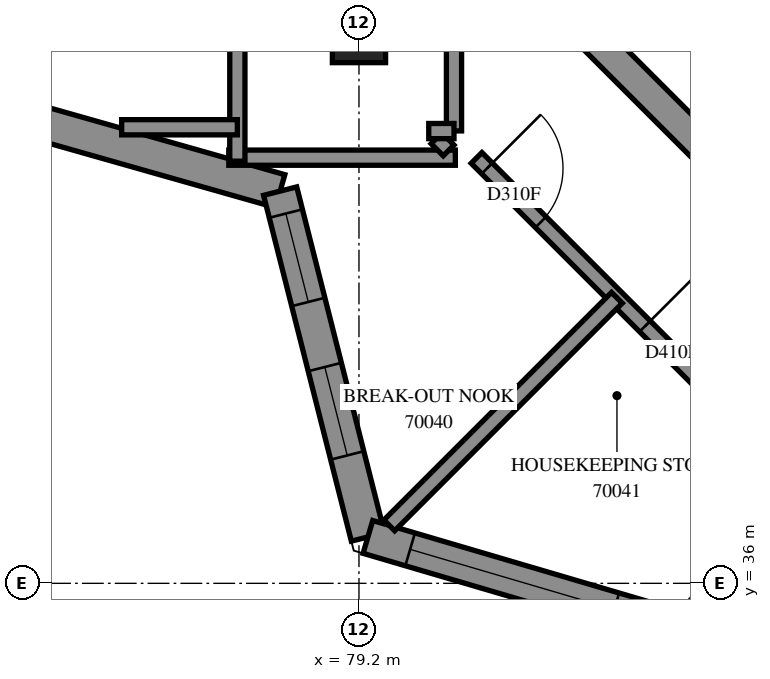
"""IFC4 building model, lengths in metres.
Left out: names, types, materials, properties, quantities, classifications, styles, units other than length and angle.
Written with IfcOpenShell. Run it as: python <this file> out.ifc"""

import sys

from ifc_helpers import new_model, si_unit, direction, frame, frame_2d, origin, origin_2d, place, context, subcontext, project, spatial, polyline, rectangle, outline, extrude, element, fill, save


model = new_model("IFC4")
c1 = context("Model", 3, precision=1e-05, world=origin(), true_north=direction((0.0, 1.0)))
c2 = subcontext(c1, "Body", "Model", "MODEL_VIEW")
j1 = project(units=[si_unit("LENGTHUNIT", "METRE"), si_unit("PLANEANGLEUNIT", "RADIAN")], contexts=[c1])
p1 = place(None, origin())
s1 = spatial("IfcSite", under=j1, at=p1, CompositionType="ELEMENT")
p2 = place(p1, origin())
s2 = spatial("IfcBuilding", under=s1, at=p2, CompositionType="ELEMENT")
p3 = place(p2, frame((0.0, 0.0, 257.4)))
s3 = spatial("IfcBuildingStorey", under=s2, at=p3, CompositionType="ELEMENT", Elevation=257.4)
p4 = place(p3, frame((79.2, 43.2, 0.0), z_axis=(0.0, 0.0, 1.0), x_axis=(1.0, 0.0, 0.0)))
e1 = element("IfcColumn", 1, at=p4, inside=s3, PredefinedType="COLUMN", context=c2, shape_type="SweptSolid", body=[
    extrude(rectangle(XDim=0.7, YDim=0.7, at=origin_2d()), origin(), (0.0, 0.0, 1.0), 3.1),
])
p5 = place(p3, frame((76.23, 49.231, -0.3), z_axis=(0.0, 0.0, 1.0), x_axis=(0.7071034917, -0.7071100706, 0.0)))
e2 = element("IfcWall", 2, at=p5, inside=s3, PredefinedType="SHEAR", context=c2, shape_type="SweptSolid", body=[
    extrude(rectangle(XDim=15.2, YDim=0.4, at=frame_2d((7.6, 0.0))), origin(), (0.0, 0.0, 1.0), 2.7),
])
p6 = place(p3, frame((78.988, 51.423, 0.0), z_axis=(0.0, 0.0, 1.0), x_axis=(0.7071067812, -0.7071067812, 0.0)))
e3 = element("IfcWall", 3, at=p6, inside=s3, PredefinedType="SOLIDWALL", context=c2, shape_type="SweptSolid", body=[
    extrude(rectangle(XDim=14.4, YDim=0.3, at=frame_2d((7.2, 0.0))), origin(), (0.0, 0.0, 1.0), 3.1),
])
p7 = place(p6, frame((1.35, 0.0, 0.0)))
e4 = element("IfcOpeningElement", 4, at=p7, cuts=e3, PredefinedType="OPENING", context=c2, shape_type="SweptSolid", body=[
    extrude(rectangle(XDim=0.9, YDim=2.1, at=frame_2d((0.45, 1.05))), frame((0.0, 0.16, 0.0), z_axis=(0.0, -1.0, 0.0), x_axis=(1.0, 0.0, 0.0)), (0.0, 0.0, 1.0), 0.32),
])
p8 = place(p6, frame((4.95, 0.0, 0.0)))
e5 = element("IfcOpeningElement", 5, at=p8, cuts=e3, PredefinedType="OPENING", context=c2, shape_type="SweptSolid", body=[
    extrude(rectangle(XDim=0.9, YDim=2.1, at=frame_2d((0.45, 1.05))), frame((0.0, 0.16, 0.0), z_axis=(0.0, -1.0, 0.0), x_axis=(1.0, 0.0, 0.0)), (0.0, 0.0, 1.0), 0.32),
])
p9 = place(p6, frame((8.55, 0.0, 0.0)))
e6 = element("IfcOpeningElement", 6, at=p9, cuts=e3, PredefinedType="OPENING", context=c2, shape_type="SweptSolid", body=[
    extrude(rectangle(XDim=0.9, YDim=2.1, at=frame_2d((0.45, 1.05))), frame((0.0, 0.16, 0.0), z_axis=(0.0, -1.0, 0.0), x_axis=(1.0, 0.0, 0.0)), (0.0, 0.0, 1.0), 0.32),
])
p10 = place(p6, frame((12.05, 0.0, 0.0)))
e7 = element("IfcOpeningElement", 7, at=p10, cuts=e3, PredefinedType="OPENING", context=c2, shape_type="SweptSolid", body=[
    extrude(rectangle(XDim=1.1, YDim=2.1, at=frame_2d((0.55, 1.05))), frame((0.0, 0.16, 0.0), z_axis=(0.0, -1.0, 0.0), x_axis=(1.0, 0.0, 0.0)), (0.0, 0.0, 1.0), 0.32),
])
p11 = place(p3, frame((74.398, 42.229, 0.0), z_axis=(0.0, 0.0, 1.0), x_axis=(0.961995937, -0.2730637604, 0.0)))
e8 = element("IfcWall", 8, at=p11, inside=s3, PredefinedType="SOLIDWALL", context=c2, shape_type="SweptSolid", body=[
    extrude(outline(polyline([(0.045, -0.225), (3.784, -0.225), (4.043, 0.225), (-0.045, 0.225), (0.045, -0.225)])), origin(), (0.0, 0.0, 1.0), 3.1),
])
p12 = place(p3, frame((78.163, 41.16, 0.0), z_axis=(0.0, 0.0, 1.0), x_axis=(0.2459778521, -0.9692754491, 0.0)))
e9 = element("IfcWall", 9, at=p12, inside=s3, PredefinedType="SOLIDWALL", context=c2, shape_type="SweptSolid", body=[
    extrude(outline(polyline([(0.13, -0.225), (4.822, -0.225), (4.566, 0.225), (-0.13, 0.225), (0.13, -0.225)])), origin(), (0.0, 0.0, 1.0), 3.1),
])
p13 = place(p12, frame((0.305, 0.0, 0.45)))
e10 = element("IfcOpeningElement", 10, at=p13, cuts=e9, PredefinedType="OPENING", context=c2, shape_type="SweptSolid", body=[
    extrude(rectangle(XDim=1.2, YDim=2.55, at=frame_2d((0.6, 1.275))), frame((0.0, 0.235, 0.0), z_axis=(0.0, -1.0, 0.0), x_axis=(1.0, 0.0, 0.0)), (0.0, 0.0, 1.0), 0.47),
])
p14 = place(p12, frame((2.388, 0.0, 0.45)))
e11 = element("IfcOpeningElement", 11, at=p14, cuts=e9, PredefinedType="OPENING", context=c2, shape_type="SweptSolid", body=[
    extrude(rectangle(XDim=1.2, YDim=2.55, at=frame_2d((0.6, 1.275))), frame((0.0, 0.235, 0.0), z_axis=(0.0, -1.0, 0.0), x_axis=(1.0, 0.0, 0.0)), (0.0, 0.0, 1.0), 0.47),
])
p15 = place(p3, frame((79.318, 36.61, 0.0), z_axis=(0.0, 0.0, 1.0), x_axis=(0.9593901398, -0.2820825406, 0.0)))
e12 = element("IfcWall", 12, at=p15, inside=s3, PredefinedType="SOLIDWALL", context=c2, shape_type="SweptSolid", body=[
    extrude(outline(polyline([(-0.128, -0.225), (4.465, -0.225), (4.711, 0.225), (0.128, 0.225), (-0.128, -0.225)])), origin(), (0.0, 0.0, 1.0), 3.1),
])
p16 = place(p15, frame((0.579, 0.0, 0.45)))
e13 = element("IfcOpeningElement", 13, at=p16, cuts=e12, PredefinedType="OPENING", context=c2, shape_type="SweptSolid", body=[
    extrude(rectangle(XDim=2.8, YDim=2.55, at=frame_2d((1.4, 1.275))), frame((0.0, 0.235, 0.0), z_axis=(0.0, -1.0, 0.0), x_axis=(1.0, 0.0, 0.0)), (0.0, 0.0, 1.0), 0.47),
])
p17 = place(p3, frame((80.747, 41.597, 0.0), z_axis=(0.0, 0.0, 1.0), x_axis=(0.7071067812, -0.7071067812, 0.0)))
e14 = element("IfcWall", 14, at=p17, inside=s3, PredefinedType="PARTITIONING", context=c2, shape_type="SweptSolid", body=[
    extrude(rectangle(XDim=8.607, YDim=0.2, at=frame_2d((4.303, 0.0))), origin(), (0.0, 0.0, 1.0), 3.1),
])
p18 = place(p17, frame((0.195, 0.0, 0.0)))
e15 = element("IfcOpeningElement", 15, at=p18, cuts=e14, PredefinedType="OPENING", context=c2, shape_type="SweptSolid", body=[
    extrude(rectangle(XDim=1.0, YDim=2.1, at=frame_2d((0.5, 1.05))), frame((0.0, 0.11, 0.0), z_axis=(0.0, -1.0, 0.0), x_axis=(1.0, 0.0, 0.0)), (0.0, 0.0, 1.0), 0.22),
])
p19 = place(p17, frame((3.133, 0.0, 0.0)))
e16 = element("IfcOpeningElement", 16, at=p19, cuts=e14, PredefinedType="OPENING", context=c2, shape_type="SweptSolid", body=[
    extrude(rectangle(XDim=1.0, YDim=2.1, at=frame_2d((0.5, 1.05))), frame((0.0, 0.11, 0.0), z_axis=(0.0, -1.0, 0.0), x_axis=(1.0, 0.0, 0.0)), (0.0, 0.0, 1.0), 0.22),
])
p20 = place(p3, frame((79.599, 36.762, 0.0), z_axis=(0.0, 0.0, 1.0), x_axis=(0.7071185876, 0.7070949745, 0.0)))
e17 = element("IfcWall", 17, at=p20, inside=s3, PredefinedType="PARTITIONING", context=c2, shape_type="SweptSolid", body=[
    extrude(rectangle(XDim=4.235, YDim=0.2, at=frame_2d((2.117, 0.0))), origin(), (0.0, 0.0, 1.0), 3.1),
])
p21 = place(p3, frame((77.487, 41.6, 0.0), z_axis=(0.0, 0.0, 1.0), x_axis=(1.0, 0.0, 0.0)))
e18 = element("IfcWall", 18, at=p21, inside=s3, PredefinedType="PARTITIONING", context=c2, shape_type="SweptSolid", body=[
    extrude(rectangle(XDim=2.981, YDim=0.2, at=frame_2d((1.49, 0.0))), origin(), (0.0, 0.0, 1.0), 3.1),
])
p22 = place(p3, frame((77.6, 41.554, 0.0), z_axis=(0.0, 0.0, 1.0), x_axis=(0.0, 1.0, 0.0)))
e19 = element("IfcWall", 19, at=p22, inside=s3, PredefinedType="PARTITIONING", context=c2, shape_type="SweptSolid", body=[
    extrude(rectangle(XDim=2.914, YDim=0.2, at=frame_2d((1.457, 0.0))), origin(), (0.0, 0.0, 1.0), 3.1),
])
p23 = place(p3, frame((80.45, 41.952, 0.0), z_axis=(0.0, 0.0, 1.0), x_axis=(0.0, 1.0, 0.0)))
e20 = element("IfcWall", 20, at=p23, inside=s3, PredefinedType="PARTITIONING", context=c2, shape_type="SweptSolid", body=[
    extrude(rectangle(XDim=2.498, YDim=0.2, at=frame_2d((1.249, 0.0))), origin(), (0.0, 0.0, 1.0), 3.1),
])
p24 = place(p3, frame((76.078, 42.0, 0.0), z_axis=(0.0, 0.0, 1.0), x_axis=(1.0, 0.0, 0.0)))
e21 = element("IfcWall", 21, at=p24, inside=s3, PredefinedType="PARTITIONING", context=c2, shape_type="SweptSolid", body=[
    extrude(rectangle(XDim=1.522, YDim=0.2, at=frame_2d((0.761, 0.0))), origin(), (0.0, 0.0, 1.0), 3.1),
])
p25 = place(p3, frame((83.528, 35.607, 0.0), z_axis=(0.0, 0.0, 1.0), x_axis=(0.7090904806, 0.7051175011, 0.0)))
e22 = element("IfcWall", 22, at=p25, inside=s3, PredefinedType="PARTITIONING", context=c2, shape_type="SweptSolid", body=[
    extrude(rectangle(XDim=0.579, YDim=0.2, at=frame_2d((0.289, 0.0))), origin(), (0.0, 0.0, 1.0), 3.1),
])
p26 = place(p3, frame((80.221, 41.855, 0.0), z_axis=(0.0, 0.0, 1.0), x_axis=(0.7068844555, -0.707329037, 0.0)))
e23 = element("IfcWall", 23, at=p26, inside=s3, PredefinedType="PARTITIONING", context=c2, shape_type="SweptSolid", body=[
    extrude(rectangle(XDim=0.225, YDim=0.2, at=frame_2d((0.112, 0.0))), origin(), (0.0, 0.0, 1.0), 3.1),
])
p27 = place(p3, frame((80.118, 41.95, 0.0), z_axis=(0.0, 0.0, 1.0), x_axis=(1.0, 0.0, 0.0)))
e24 = element("IfcWall", 24, at=p27, inside=s3, PredefinedType="PARTITIONING", context=c2, shape_type="SweptSolid", body=[
    extrude(rectangle(XDim=0.332, YDim=0.2, at=frame_2d((0.166, 0.0))), origin(), (0.0, 0.0, 1.0), 3.1),
])
p28 = place(p13, origin())
e25 = element("IfcWindow", 25, at=p28, inside=s3, PartitioningType="SINGLE_PANEL", PredefinedType="WINDOW", context=c2, shape_type="SweptSolid", body=[
    extrude(rectangle(XDim=1.2, YDim=2.55, at=frame_2d((0.6, 1.275))), frame((0.0, 0.205, 0.0), z_axis=(0.0, -1.0, 0.0), x_axis=(1.0, 0.0, 0.0)), (0.0, 0.0, 1.0), 0.06),
])
fill(e10, e25)
p29 = place(p14, origin())
e26 = element("IfcWindow", 26, at=p29, inside=s3, PartitioningType="SINGLE_PANEL", PredefinedType="WINDOW", context=c2, shape_type="SweptSolid", body=[
    extrude(rectangle(XDim=1.2, YDim=2.55, at=frame_2d((0.6, 1.275))), frame((0.0, 0.205, 0.0), z_axis=(0.0, -1.0, 0.0), x_axis=(1.0, 0.0, 0.0)), (0.0, 0.0, 1.0), 0.06),
])
fill(e11, e26)
p30 = place(p16, origin())
e27 = element("IfcWindow", 27, at=p30, inside=s3, PartitioningType="SINGLE_PANEL", PredefinedType="WINDOW", context=c2, shape_type="SweptSolid", body=[
    extrude(rectangle(XDim=2.8, YDim=2.55, at=frame_2d((1.4, 1.275))), frame((0.0, 0.205, 0.0), z_axis=(0.0, -1.0, 0.0), x_axis=(1.0, 0.0, 0.0)), (0.0, 0.0, 1.0), 0.06),
])
fill(e13, e27)
p31 = place(p18, origin())
e28 = element("IfcDoor", 28, at=p31, inside=s3, OperationType="SINGLE_SWING_LEFT", PredefinedType="DOOR", context=c2, shape_type="SweptSolid", body=[
    extrude(rectangle(XDim=1.0, YDim=2.1, at=frame_2d((0.5, 1.05))), frame((0.0, 0.025, 0.0), z_axis=(0.0, -1.0, 0.0), x_axis=(1.0, 0.0, 0.0)), (0.0, 0.0, 1.0), 0.05),
])
fill(e15, e28)
p32 = place(p19, origin())
e29 = element("IfcDoor", 29, at=p32, inside=s3, OperationType="SINGLE_SWING_LEFT", PredefinedType="DOOR", context=c2, shape_type="SweptSolid", body=[
    extrude(rectangle(XDim=1.0, YDim=2.1, at=frame_2d((0.5, 1.05))), frame((0.0, 0.025, 0.0), z_axis=(0.0, -1.0, 0.0), x_axis=(1.0, 0.0, 0.0)), (0.0, 0.0, 1.0), 0.05),
])
fill(e16, e29)
save(model, sys.argv[1])
